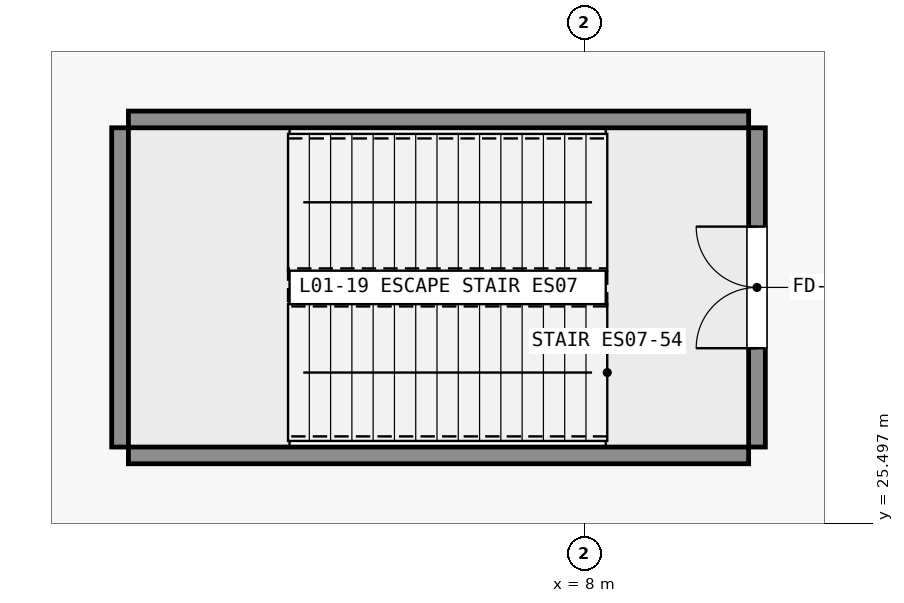
"""IFC4 building model, lengths in metres.
Left out: names, types, materials, properties, quantities, classifications, styles, units other than length and angle.
Written with IfcOpenShell. Run it as: python <this file> out.ifc"""

import sys

from ifc_helpers import new_model, si_unit, direction, frame, frame_2d, origin, place, context, subcontext, project, spatial, rectangle, extrude, element, fill, save


model = new_model("IFC4")
c1 = context("Model", 3, precision=1e-05, world=origin(), true_north=direction((0.0, 1.0)))
c2 = subcontext(c1, "Body", "Model", "MODEL_VIEW")
j1 = project(units=[si_unit("LENGTHUNIT", "METRE"), si_unit("PLANEANGLEUNIT", "RADIAN")], contexts=[c1])
p1 = place(None, origin())
s1 = spatial("IfcSite", under=j1, at=p1, CompositionType="ELEMENT")
p2 = place(p1, origin())
s2 = spatial("IfcBuilding", under=s1, at=p2, CompositionType="ELEMENT")
p3 = place(p2, frame((0.0, 0.0, 6.0)))
s3 = spatial("IfcBuildingStorey", under=s2, at=p3, CompositionType="ELEMENT", Elevation=6.0)
for number, where, z_axis, x_axis in (
    (1, (2.0, 26.39, 0.0), (0.0, 0.0, 1.0), (1.0, 0.0, 0.0)),
    (2, (2.0, 30.81, 0.0), (0.0, 0.0, 1.0), (1.0, 0.0, 0.0)),
):
    element("IfcWall", number, at=place(p3, frame(where, z_axis=z_axis, x_axis=x_axis)), inside=s3, PredefinedType="SHEAR", context=c2, shape_type="SweptSolid", body=[
        extrude(rectangle(XDim=8.16, YDim=0.22, at=frame_2d((4.08, 0.0))), origin(), (0.0, 0.0, 1.0), 5.4),
    ])
p4 = place(p3, frame((1.89, 26.5, 0.0), z_axis=(0.0, 0.0, 1.0), x_axis=(0.0, 1.0, 0.0)))
e3 = element("IfcWall", 3, at=p4, inside=s3, PredefinedType="SHEAR", context=c2, shape_type="SweptSolid", body=[
    extrude(rectangle(XDim=4.2, YDim=0.22, at=frame_2d((2.1, 0.0))), origin(), (0.0, 0.0, 1.0), 5.4),
])
p5 = place(p3, frame((10.27, 26.5, 0.0), z_axis=(0.0, 0.0, 1.0), x_axis=(0.0, 1.0, 0.0)))
e4 = element("IfcWall", 4, at=p5, inside=s3, PredefinedType="SHEAR", context=c2, shape_type="SweptSolid", body=[
    extrude(rectangle(XDim=4.2, YDim=0.22, at=frame_2d((2.1, 0.0))), origin(), (0.0, 0.0, 1.0), 5.4),
])
p6 = place(p5, frame((1.3, 0.0, 0.0)))
e5 = element("IfcOpeningElement", 5, at=p6, cuts=e4, PredefinedType="OPENING", context=c2, shape_type="SweptSolid", body=[
    extrude(rectangle(XDim=1.6, YDim=2.2, at=frame_2d((0.8, 1.1))), frame((0.0, 0.12, 0.0), z_axis=(0.0, -1.0, 0.0), x_axis=(1.0, 0.0, 0.0)), (0.0, 0.0, 1.0), 0.24),
])
p7 = place(p6, origin())
e6 = element("IfcDoor", 6, at=p7, inside=s3, OperationType="DOUBLE_DOOR_SINGLE_SWING", PredefinedType="DOOR", context=c2, shape_type="SweptSolid", body=[
    extrude(rectangle(XDim=1.6, YDim=2.2, at=frame_2d((0.8, 1.1))), frame((0.0, 0.025, 0.0), z_axis=(0.0, -1.0, 0.0), x_axis=(1.0, 0.0, 0.0)), (0.0, 0.0, 1.0), 0.05),
])
fill(e5, e6)
save(model, sys.argv[1])
